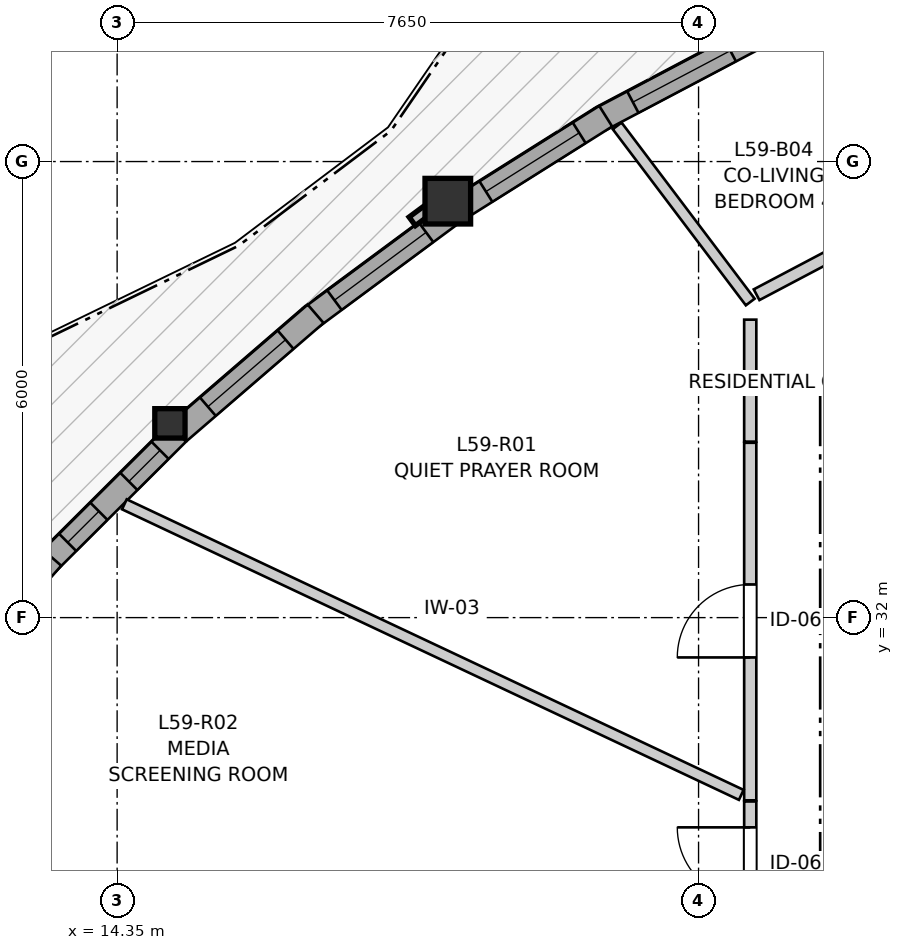
"""IFC4 building model, lengths in metres.
Left out: names, types, materials, properties, quantities, classifications, styles, units other than length and angle.
Written with IfcOpenShell. Run it as: python <this file> out.ifc"""

import sys

from ifc_helpers import new_model, si_unit, direction, frame, frame_2d, origin, origin_2d, place, context, subcontext, project, spatial, rectangle, i_section, extrude, source, transform, mapped, element, fill, save


model = new_model("IFC4")
c1 = context("Model", 3, precision=1e-05, world=origin(), true_north=direction((0.0, 1.0)))
c2 = subcontext(c1, "Body", "Model", "MODEL_VIEW")
j1 = project(units=[si_unit("LENGTHUNIT", "METRE"), si_unit("PLANEANGLEUNIT", "RADIAN")], contexts=[c1])
p1 = place(None, origin())
s1 = spatial("IfcSite", under=j1, at=p1, CompositionType="ELEMENT")
p2 = place(p1, origin())
s2 = spatial("IfcBuilding", under=s1, at=p2, CompositionType="ELEMENT")
p3 = place(p2, frame((0.0, 0.0, 198.8)))
s3 = spatial("IfcBuildingStorey", under=s2, at=p3, CompositionType="ELEMENT", Elevation=198.8)
m1 = source(origin(), c2, "Body", "SweptSolid", [
    extrude(rectangle(XDim=0.6, YDim=0.6, at=origin_2d()), origin(), (0.0, 0.0, 1.0), 2.96),
])
p4 = place(p3, frame((18.701, 37.479, 0.0), z_axis=(0.0, 0.0, 1.0), x_axis=(1.0, 0.0, 0.0)))
e1 = element("IfcColumn", 1, at=p4, inside=s3, PredefinedType="COLUMN", context=c2, shape_type="MappedRepresentation", body=[
    mapped(m1, transform((0.0, 0.0, 0.0), x_axis=(1.0, 0.0, 0.0), y_axis=(0.0, 1.0, 0.0), z_axis=(0.0, 0.0, 1.0), scale=1.0)),
])
m2 = source(origin(), c2, "Body", "SweptSolid", [
    extrude(i_section(OverallWidth=0.398, OverallDepth=0.387, WebThickness=0.019, FlangeThickness=0.03, FilletRadius=0.015, at=origin_2d()), origin(), (0.0, 0.0, 1.0), 2.96),
])
p5 = place(p3, frame((15.044, 34.555, 0.0), z_axis=(0.0, 0.0, 1.0), x_axis=(1.0, 0.0, 0.0)))
e2 = element("IfcColumn", 2, at=p5, inside=s3, PredefinedType="PILASTER", context=c2, shape_type="MappedRepresentation", body=[
    mapped(m2, transform((0.0, 0.0, 0.0), x_axis=(1.0, 0.0, 0.0), y_axis=(0.0, 1.0, 0.0), z_axis=(0.0, 0.0, 1.0), scale=1.0)),
])
p6 = place(p3, frame((22.766, 39.642, 0.0), z_axis=(0.0, 0.0, 1.0), x_axis=(-0.884377555637, -0.466772256122, 0.0)))
e3 = element("IfcWall", 3, at=p6, inside=s3, PredefinedType="SOLIDWALL", context=c2, shape_type="SweptSolid", body=[
    extrude(rectangle(XDim=2.334, YDim=0.32, at=frame_2d((1.167, 0.0))), origin(), (0.0, 0.0, 1.0), 2.58),
])
p7 = place(p6, frame((0.393, 0.0, 0.82)))
e4 = element("IfcOpeningElement", 4, at=p7, cuts=e3, PredefinedType="OPENING", context=c2, shape_type="SweptSolid", body=[
    extrude(rectangle(XDim=1.45, YDim=1.25, at=frame_2d((0.725, 0.625))), frame((0.0, 0.17, 0.0), z_axis=(0.0, -1.0, 0.0), x_axis=(1.0, 0.0, 0.0)), (0.0, 0.0, 1.0), 0.34),
])
p8 = place(p3, frame((20.778, 38.597, 0.0), z_axis=(0.0, 0.0, 1.0), x_axis=(-0.84639489148, -0.532555807101, 0.0)))
e5 = element("IfcWall", 5, at=p8, inside=s3, PredefinedType="SOLIDWALL", context=c2, shape_type="SweptSolid", body=[
    extrude(rectangle(XDim=2.264, YDim=0.32, at=frame_2d((1.132, 0.0))), origin(), (0.0, 0.0, 1.0), 2.58),
])
p9 = place(p8, frame((0.412, 0.0, 0.82)))
e6 = element("IfcOpeningElement", 6, at=p9, cuts=e5, PredefinedType="OPENING", context=c2, shape_type="SweptSolid", body=[
    extrude(rectangle(XDim=1.45, YDim=1.25, at=frame_2d((0.725, 0.625))), frame((0.0, 0.17, 0.0), z_axis=(0.0, -1.0, 0.0), x_axis=(1.0, 0.0, 0.0)), (0.0, 0.0, 1.0), 0.34),
])
p10 = place(p3, frame((18.724, 37.296, 0.0), z_axis=(0.0, 0.0, 1.0), x_axis=(-0.803830620004, -0.59485824727, 0.0)))
e7 = element("IfcWall", 7, at=p10, inside=s3, PredefinedType="SOLIDWALL", context=c2, shape_type="SweptSolid", body=[
    extrude(rectangle(XDim=2.277, YDim=0.32, at=frame_2d((1.139, 0.0))), origin(), (0.0, 0.0, 1.0), 2.58),
])
p11 = place(p10, frame((0.384, 0.0, 0.82)))
e8 = element("IfcOpeningElement", 8, at=p11, cuts=e7, PredefinedType="OPENING", context=c2, shape_type="SweptSolid", body=[
    extrude(rectangle(XDim=1.5, YDim=1.45, at=frame_2d((0.75, 0.725))), frame((0.0, 0.17, 0.0), z_axis=(0.0, -1.0, 0.0), x_axis=(1.0, 0.0, 0.0)), (0.0, 0.0, 1.0), 0.34),
])
p12 = place(p3, frame((16.962, 35.997, 0.0), z_axis=(0.0, 0.0, 1.0), x_axis=(-0.757474860475, -0.652864331808, 0.0)))
e9 = element("IfcWall", 9, at=p12, inside=s3, PredefinedType="SOLIDWALL", context=c2, shape_type="SweptSolid", body=[
    extrude(rectangle(XDim=2.374, YDim=0.32, at=frame_2d((1.187, 0.0))), origin(), (0.0, 0.0, 1.0), 2.58),
])
p13 = place(p12, frame((0.522, 0.0, 0.82)))
e10 = element("IfcOpeningElement", 10, at=p13, cuts=e9, PredefinedType="OPENING", context=c2, shape_type="SweptSolid", body=[
    extrude(rectangle(XDim=1.35, YDim=1.45, at=frame_2d((0.675, 0.725))), frame((0.0, 0.17, 0.0), z_axis=(0.0, -1.0, 0.0), x_axis=(1.0, 0.0, 0.0)), (0.0, 0.0, 1.0), 0.34),
])
p14 = place(p3, frame((15.143, 34.428, 0.0), z_axis=(0.0, 0.0, 1.0), x_axis=(-0.708370597245, -0.705840702255, 0.0)))
e11 = element("IfcWall", 11, at=p14, inside=s3, PredefinedType="SOLIDWALL", context=c2, shape_type="SweptSolid", body=[
    extrude(rectangle(XDim=2.413, YDim=0.32, at=frame_2d((1.206, 0.0))), origin(), (0.0, 0.0, 1.0), 2.58),
])
p15 = place(p14, frame((0.322, 0.0, 0.82)))
e12 = element("IfcOpeningElement", 12, at=p15, cuts=e11, PredefinedType="OPENING", context=c2, shape_type="SweptSolid", body=[
    extrude(rectangle(XDim=0.58, YDim=1.35, at=frame_2d((0.29, 0.675))), frame((0.0, 0.17, 0.0), z_axis=(0.0, -1.0, 0.0), x_axis=(1.0, 0.0, 0.0)), (0.0, 0.0, 1.0), 0.34),
])
p16 = place(p14, frame((1.458, 0.0, 0.82)))
e13 = element("IfcOpeningElement", 13, at=p16, cuts=e11, PredefinedType="OPENING", context=c2, shape_type="SweptSolid", body=[
    extrude(rectangle(XDim=0.58, YDim=1.35, at=frame_2d((0.29, 0.675))), frame((0.0, 0.17, 0.0), z_axis=(0.0, -1.0, 0.0), x_axis=(1.0, 0.0, 0.0)), (0.0, 0.0, 1.0), 0.34),
])
p17 = place(p3, frame((13.494, 32.789, 0.0), z_axis=(0.0, 0.0, 1.0), x_axis=(-0.65765213646, -0.753321755566, 0.0)))
e14 = element("IfcWall", 14, at=p17, inside=s3, PredefinedType="SOLIDWALL", context=c2, shape_type="SweptSolid", body=[
    extrude(rectangle(XDim=2.394, YDim=0.32, at=frame_2d((1.197, 0.0))), origin(), (0.0, 0.0, 1.0), 2.58),
])
p18 = place(p17, frame((0.677, 0.0, 0.82)))
e15 = element("IfcOpeningElement", 15, at=p18, cuts=e14, PredefinedType="OPENING", context=c2, shape_type="SweptSolid", body=[
    extrude(rectangle(XDim=1.05, YDim=1.45, at=frame_2d((0.525, 0.725))), frame((0.0, 0.17, 0.0), z_axis=(0.0, -1.0, 0.0), x_axis=(1.0, 0.0, 0.0)), (0.0, 0.0, 1.0), 0.34),
])
p19 = place(p3, frame((22.68, 29.596, 0.0), z_axis=(0.0, 0.0, 1.0), x_axis=(0.0, 1.0, 0.0)))
e16 = element("IfcWall", 16, at=p19, inside=s3, PredefinedType="PARTITIONING", context=c2, shape_type="SweptSolid", body=[
    extrude(rectangle(XDim=4.704, YDim=0.16, at=frame_2d((2.352, 0.0))), origin(), (0.0, 0.0, 1.0), 2.96),
])
p20 = place(p19, frame((1.88, 0.0, 0.0)))
e17 = element("IfcOpeningElement", 17, at=p20, cuts=e16, PredefinedType="OPENING", context=c2, shape_type="SweptSolid", body=[
    extrude(rectangle(XDim=0.96, YDim=2.1, at=frame_2d((0.48, 1.05))), frame((0.0, 0.09, 0.0), z_axis=(0.0, -1.0, 0.0), x_axis=(1.0, 0.0, 0.0)), (0.0, 0.0, 1.0), 0.18),
])
p21 = place(p3, frame((22.68, 27.85, 0.0), z_axis=(0.0, 0.0, 1.0), x_axis=(0.0, 1.0, 0.0)))
e18 = element("IfcWall", 18, at=p21, inside=s3, PredefinedType="PARTITIONING", context=c2, shape_type="SweptSolid", body=[
    extrude(rectangle(XDim=1.731, YDim=0.16, at=frame_2d((0.865, 0.0))), origin(), (0.0, 0.0, 1.0), 2.96),
])
p22 = place(p21, frame((0.43, 0.0, 0.0)))
e19 = element("IfcOpeningElement", 19, at=p22, cuts=e18, PredefinedType="OPENING", context=c2, shape_type="SweptSolid", body=[
    extrude(rectangle(XDim=0.96, YDim=2.1, at=frame_2d((0.48, 1.05))), frame((0.0, 0.09, 0.0), z_axis=(0.0, -1.0, 0.0), x_axis=(1.0, 0.0, 0.0)), (0.0, 0.0, 1.0), 0.18),
])
p23 = place(p3, frame((14.445, 33.49, 0.0), z_axis=(0.0, 0.0, 1.0), x_axis=(0.904673727325, -0.426104971912, 0.0)))
e20 = element("IfcWall", 20, at=p23, inside=s3, PredefinedType="PARTITIONING", context=c2, shape_type="SweptSolid", body=[
    extrude(rectangle(XDim=8.972, YDim=0.145, at=frame_2d((4.486, 0.0))), origin(), (0.0, 0.0, 1.0), 2.96),
])
p24 = place(p3, frame((20.929, 38.469, 0.0), z_axis=(0.0, 0.0, 1.0), x_axis=(0.602847358209, -0.797856542682, 0.0)))
e21 = element("IfcWall", 21, at=p24, inside=s3, PredefinedType="PARTITIONING", context=c2, shape_type="SweptSolid", body=[
    extrude(rectangle(XDim=2.905, YDim=0.145, at=frame_2d((1.452, 0.0))), origin(), (0.0, 0.0, 1.0), 2.96),
])
p25 = place(p3, frame((22.68, 34.315, 0.0), z_axis=(0.0, 0.0, 1.0), x_axis=(0.0, 1.0, 0.0)))
e22 = element("IfcWall", 22, at=p25, inside=s3, PredefinedType="PARTITIONING", context=c2, shape_type="SweptSolid", body=[
    extrude(rectangle(XDim=1.605, YDim=0.16, at=frame_2d((0.802, 0.0))), origin(), (0.0, 0.0, 1.0), 2.96),
])
p26 = place(p3, frame((22.764, 36.248, 0.0), z_axis=(0.0, 0.0, 1.0), x_axis=(0.884318813942, 0.466883535059, 0.0)))
e23 = element("IfcWall", 23, at=p26, inside=s3, PredefinedType="PARTITIONING", context=c2, shape_type="SweptSolid", body=[
    extrude(rectangle(XDim=1.486, YDim=0.16, at=frame_2d((0.743, 0.0))), origin(), (0.0, 0.0, 1.0), 2.96),
])
m3 = source(origin(), c2, "Body", "SweptSolid", [
    extrude(rectangle(XDim=1.45, YDim=1.25, at=frame_2d((0.725, 0.625))), frame((0.0, 0.03, 0.0), z_axis=(0.0, -1.0, 0.0), x_axis=(1.0, 0.0, 0.0)), (0.0, 0.0, 1.0), 0.06),
])
p27 = place(p7, origin())
e24 = element("IfcWindow", 24, at=p27, inside=s3, PartitioningType="SINGLE_PANEL", PredefinedType="WINDOW", context=c2, shape_type="MappedRepresentation", body=[
    mapped(m3, transform((0.0, 0.0, 0.0), x_axis=(1.0, 0.0, 0.0), y_axis=(0.0, 1.0, 0.0), z_axis=(0.0, 0.0, 1.0), scale=1.0)),
])
fill(e4, e24)
p28 = place(p9, origin())
e25 = element("IfcWindow", 25, at=p28, inside=s3, PartitioningType="SINGLE_PANEL", PredefinedType="WINDOW", context=c2, shape_type="MappedRepresentation", body=[
    mapped(m3, transform((0.0, 0.0, 0.0), x_axis=(1.0, 0.0, 0.0), y_axis=(0.0, 1.0, 0.0), z_axis=(0.0, 0.0, 1.0), scale=1.0)),
])
fill(e6, e25)
m4 = source(origin(), c2, "Body", "SweptSolid", [
    extrude(rectangle(XDim=1.5, YDim=1.45, at=frame_2d((0.75, 0.725))), frame((0.0, 0.03, 0.0), z_axis=(0.0, -1.0, 0.0), x_axis=(1.0, 0.0, 0.0)), (0.0, 0.0, 1.0), 0.06),
])
p29 = place(p11, origin())
e26 = element("IfcWindow", 26, at=p29, inside=s3, PartitioningType="SINGLE_PANEL", PredefinedType="WINDOW", context=c2, shape_type="MappedRepresentation", body=[
    mapped(m4, transform((0.0, 0.0, 0.0), x_axis=(1.0, 0.0, 0.0), y_axis=(0.0, 1.0, 0.0), z_axis=(0.0, 0.0, 1.0), scale=1.0)),
])
fill(e8, e26)
m5 = source(origin(), c2, "Body", "SweptSolid", [
    extrude(rectangle(XDim=1.35, YDim=1.45, at=frame_2d((0.675, 0.725))), frame((0.0, 0.03, 0.0), z_axis=(0.0, -1.0, 0.0), x_axis=(1.0, 0.0, 0.0)), (0.0, 0.0, 1.0), 0.06),
])
p30 = place(p13, origin())
e27 = element("IfcWindow", 27, at=p30, inside=s3, PartitioningType="SINGLE_PANEL", PredefinedType="WINDOW", context=c2, shape_type="MappedRepresentation", body=[
    mapped(m5, transform((0.0, 0.0, 0.0), x_axis=(1.0, 0.0, 0.0), y_axis=(0.0, 1.0, 0.0), z_axis=(0.0, 0.0, 1.0), scale=1.0)),
])
fill(e10, e27)
m6 = source(origin(), c2, "Body", "SweptSolid", [
    extrude(rectangle(XDim=0.58, YDim=1.35, at=frame_2d((0.29, 0.675))), frame((0.0, 0.03, 0.0), z_axis=(0.0, -1.0, 0.0), x_axis=(1.0, 0.0, 0.0)), (0.0, 0.0, 1.0), 0.06),
])
p31 = place(p15, origin())
e28 = element("IfcWindow", 28, at=p31, inside=s3, PartitioningType="SINGLE_PANEL", PredefinedType="WINDOW", context=c2, shape_type="MappedRepresentation", body=[
    mapped(m6, transform((0.0, 0.0, 0.0), x_axis=(1.0, 0.0, 0.0), y_axis=(0.0, 1.0, 0.0), z_axis=(0.0, 0.0, 1.0), scale=1.0)),
])
fill(e12, e28)
p32 = place(p16, origin())
e29 = element("IfcWindow", 29, at=p32, inside=s3, PartitioningType="SINGLE_PANEL", PredefinedType="WINDOW", context=c2, shape_type="MappedRepresentation", body=[
    mapped(m6, transform((0.0, 0.0, 0.0), x_axis=(1.0, 0.0, 0.0), y_axis=(0.0, 1.0, 0.0), z_axis=(0.0, 0.0, 1.0), scale=1.0)),
])
fill(e13, e29)
m7 = source(origin(), c2, "Body", "SweptSolid", [
    extrude(rectangle(XDim=0.96, YDim=2.1, at=frame_2d((0.48, 1.05))), frame((0.0, 0.025, 0.0), z_axis=(0.0, -1.0, 0.0), x_axis=(1.0, 0.0, 0.0)), (0.0, 0.0, 1.0), 0.05),
])
p33 = place(p20, origin())
e30 = element("IfcDoor", 30, at=p33, inside=s3, OperationType="SINGLE_SWING_LEFT", PredefinedType="DOOR", context=c2, shape_type="MappedRepresentation", body=[
    mapped(m7, transform((0.0, 0.0, 0.0), x_axis=(1.0, 0.0, 0.0), y_axis=(0.0, 1.0, 0.0), z_axis=(0.0, 0.0, 1.0), scale=1.0)),
])
fill(e17, e30)
p34 = place(p22, origin())
e31 = element("IfcDoor", 31, at=p34, inside=s3, OperationType="SINGLE_SWING_RIGHT", PredefinedType="DOOR", context=c2, shape_type="MappedRepresentation", body=[
    mapped(m7, transform((0.0, 0.0, 0.0), x_axis=(1.0, 0.0, 0.0), y_axis=(0.0, 1.0, 0.0), z_axis=(0.0, 0.0, 1.0), scale=1.0)),
])
fill(e19, e31)
save(model, sys.argv[1])
